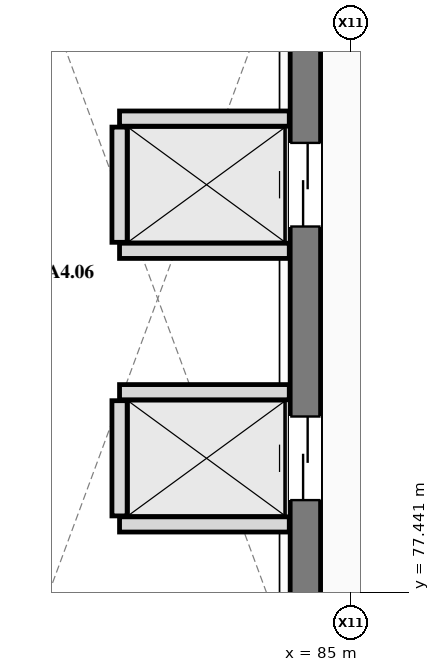
"""IFC4 building model, lengths in metres.
Left out: names, types, materials, properties, quantities, classifications, styles, units other than length and angle.
Written with IfcOpenShell. Run it as: python <this file> out.ifc"""

import sys

from ifc_helpers import new_model, si_unit, direction, frame, frame_2d, origin, place, context, subcontext, project, spatial, rectangle, extrude, element, fill, save


model = new_model("IFC4")
c1 = context("Model", 3, precision=1e-05, world=origin(), true_north=direction((0.0, 1.0)))
c2 = subcontext(c1, "Body", "Model", "MODEL_VIEW")
j1 = project(units=[si_unit("LENGTHUNIT", "METRE"), si_unit("PLANEANGLEUNIT", "RADIAN")], contexts=[c1])
p1 = place(None, origin())
s1 = spatial("IfcSite", under=j1, at=p1, CompositionType="ELEMENT")
p2 = place(p1, origin())
s2 = spatial("IfcBuilding", under=s1, at=p2, CompositionType="ELEMENT")
p3 = place(p2, frame((0.0, 0.0, 10.8)))
s3 = spatial("IfcBuildingStorey", under=s2, at=p3, CompositionType="ELEMENT", Elevation=10.8)
p4 = place(p3, frame((84.4, 76.6, 0.0), z_axis=(0.0, 0.0, 1.0), x_axis=(0.0, 1.0, 0.0)))
e1 = element("IfcWall", 1, at=p4, inside=s3, PredefinedType="SHEAR", context=c2, shape_type="SweptSolid", body=[
    extrude(rectangle(XDim=9.4, YDim=0.4, at=frame_2d((4.7, 0.0))), origin(), (0.0, 0.0, 1.0), 4.8),
])
p5 = place(p4, frame((2.05, 0.0, 0.0)))
e2 = element("IfcOpeningElement", 2, at=p5, cuts=e1, PredefinedType="OPENING", context=c2, shape_type="SweptSolid", body=[
    extrude(rectangle(XDim=1.1, YDim=2.2, at=frame_2d((0.55, 1.1))), frame((0.0, 0.21, 0.0), z_axis=(0.0, -1.0, 0.0), x_axis=(1.0, 0.0, 0.0)), (0.0, 0.0, 1.0), 0.42),
])
p6 = place(p4, frame((5.65, 0.0, 0.0)))
e3 = element("IfcOpeningElement", 3, at=p6, cuts=e1, PredefinedType="OPENING", context=c2, shape_type="SweptSolid", body=[
    extrude(rectangle(XDim=1.1, YDim=2.2, at=frame_2d((0.55, 1.1))), frame((0.0, 0.21, 0.0), z_axis=(0.0, -1.0, 0.0), x_axis=(1.0, 0.0, 0.0)), (0.0, 0.0, 1.0), 0.42),
])
for number, where, z_axis, x_axis in (
    (4, (81.955, 78.33, 0.0), (0.0, 0.0, 1.0), (1.0, 0.0, 0.0)),
    (5, (81.955, 80.07, 0.0), (0.0, 0.0, 1.0), (1.0, 0.0, 0.0)),
):
    element("IfcWall", number, at=place(p3, frame(where, z_axis=z_axis, x_axis=x_axis)), inside=s3, PredefinedType="PLUMBINGWALL", context=c2, shape_type="SweptSolid", body=[
        extrude(rectangle(XDim=2.233, YDim=0.2, at=frame_2d((1.116, 0.0))), origin(), (0.0, 0.0, 1.0), 4.475),
    ])
p7 = place(p3, frame((81.955, 78.442, 0.0), z_axis=(0.0, 0.0, 1.0), x_axis=(0.0, 1.0, 0.0)))
e6 = element("IfcWall", 6, at=p7, inside=s3, PredefinedType="PLUMBINGWALL", context=c2, shape_type="SweptSolid", body=[
    extrude(rectangle(XDim=1.516, YDim=0.2, at=frame_2d((0.758, 0.0))), origin(), (0.0, 0.0, 1.0), 4.475),
])
for number, where, z_axis, x_axis in (
    (7, (81.955, 81.93, 0.0), (0.0, 0.0, 1.0), (1.0, 0.0, 0.0)),
    (8, (81.955, 83.67, 0.0), (0.0, 0.0, 1.0), (1.0, 0.0, 0.0)),
):
    element("IfcWall", number, at=place(p3, frame(where, z_axis=z_axis, x_axis=x_axis)), inside=s3, PredefinedType="PLUMBINGWALL", context=c2, shape_type="SweptSolid", body=[
        extrude(rectangle(XDim=2.233, YDim=0.2, at=frame_2d((1.116, 0.0))), origin(), (0.0, 0.0, 1.0), 4.475),
    ])
p8 = place(p3, frame((81.955, 82.042, 0.0), z_axis=(0.0, 0.0, 1.0), x_axis=(0.0, 1.0, 0.0)))
e9 = element("IfcWall", 9, at=p8, inside=s3, PredefinedType="PLUMBINGWALL", context=c2, shape_type="SweptSolid", body=[
    extrude(rectangle(XDim=1.516, YDim=0.2, at=frame_2d((0.758, 0.0))), origin(), (0.0, 0.0, 1.0), 4.475),
])
p9 = place(p5, origin())
e10 = element("IfcDoor", 10, at=p9, inside=s3, OperationType="SLIDING_TO_LEFT", PredefinedType="DOOR", context=c2, shape_type="SweptSolid", body=[
    extrude(rectangle(XDim=1.1, YDim=2.2, at=frame_2d((0.55, 1.1))), frame((0.0, 0.025, 0.0), z_axis=(0.0, -1.0, 0.0), x_axis=(1.0, 0.0, 0.0)), (0.0, 0.0, 1.0), 0.05),
])
fill(e2, e10)
p10 = place(p6, origin())
e11 = element("IfcDoor", 11, at=p10, inside=s3, OperationType="SLIDING_TO_RIGHT", PredefinedType="DOOR", context=c2, shape_type="SweptSolid", body=[
    extrude(rectangle(XDim=1.1, YDim=2.2, at=frame_2d((0.55, 1.1))), frame((0.0, 0.025, 0.0), z_axis=(0.0, -1.0, 0.0), x_axis=(1.0, 0.0, 0.0)), (0.0, 0.0, 1.0), 0.05),
])
fill(e3, e11)
save(model, sys.argv[1])
